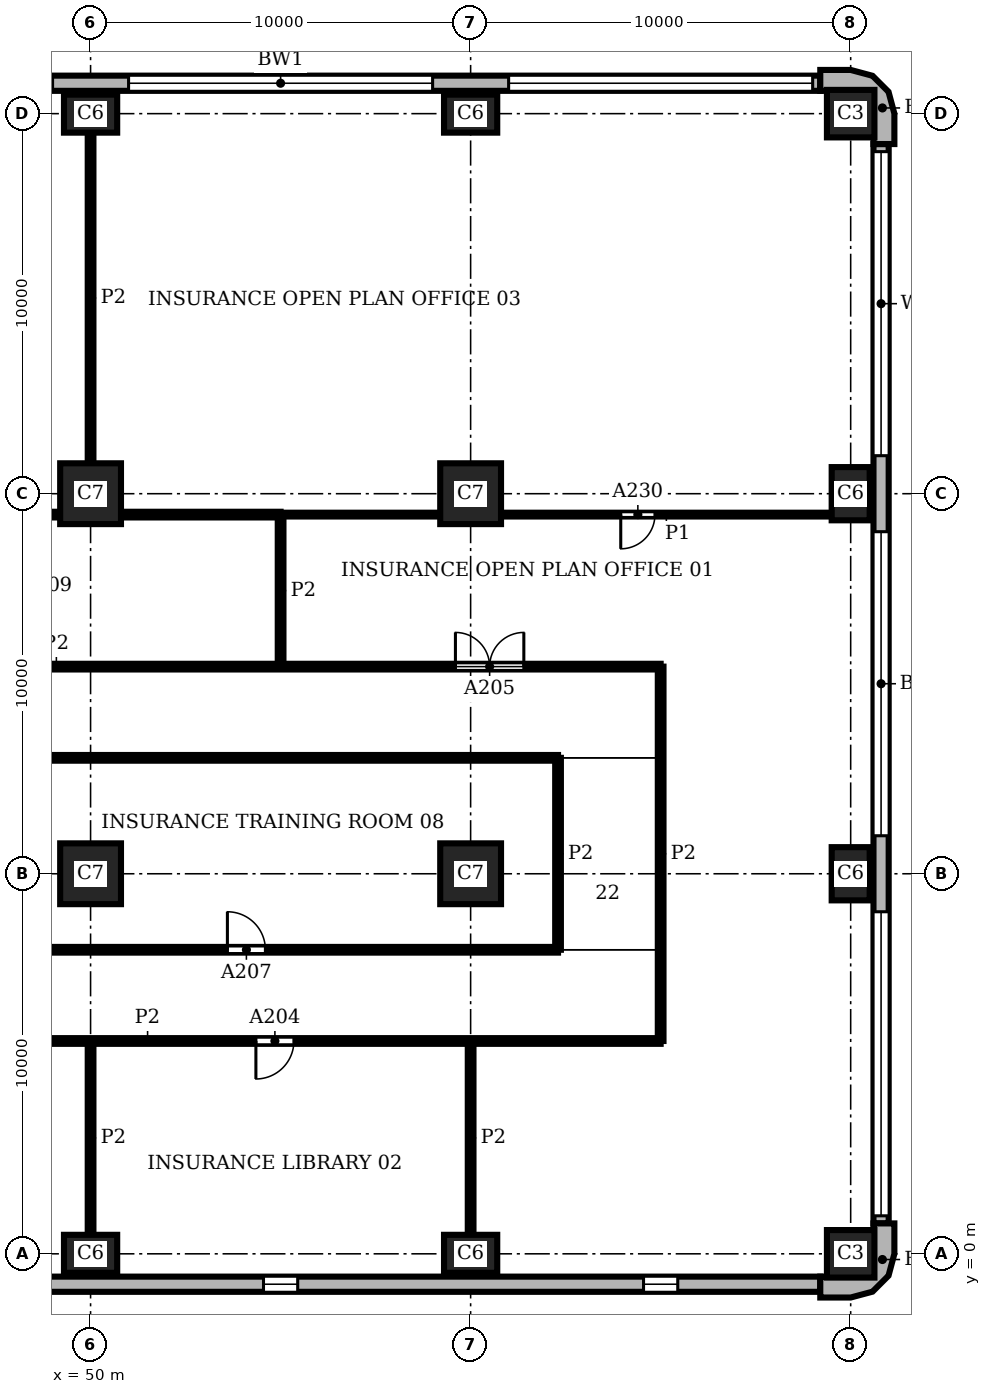
"""IFC4 building model, lengths in metres.
Left out: names, types, materials, properties, quantities, classifications, styles, units other than length and angle.
Written with IfcOpenShell. Run it as: python <this file> out.ifc"""

import sys

from ifc_helpers import new_model, si_unit, direction, frame, frame_2d, origin, origin_2d, place, context, subcontext, project, spatial, polyline, rectangle, outline, extrude, element, fill, save


model = new_model("IFC4")
c1 = context("Model", 3, precision=1e-05, world=origin(), true_north=direction((0.0, 1.0)))
c2 = subcontext(c1, "Body", "Model", "MODEL_VIEW")
j1 = project(units=[si_unit("LENGTHUNIT", "METRE"), si_unit("PLANEANGLEUNIT", "RADIAN")], contexts=[c1])
p1 = place(None, origin())
s1 = spatial("IfcSite", under=j1, at=p1, CompositionType="ELEMENT")
p2 = place(p1, origin())
s2 = spatial("IfcBuilding", under=s1, at=p2, CompositionType="ELEMENT")
p3 = place(p2, frame((0.0, 0.0, 23.7)))
s3 = spatial("IfcBuildingStorey", under=s2, at=p3, CompositionType="ELEMENT", Elevation=23.7)
for number, where, z_axis, x_axis in (
    (1, (50.0, 0.0, 0.0), (0.0, 0.0, 1.0), (1.0, 0.0, 0.0)),
    (2, (60.0, 0.0, 0.0), (0.0, 0.0, 1.0), (1.0, 0.0, 0.0)),
):
    element("IfcColumn", number, at=place(p3, frame(where, z_axis=z_axis, x_axis=x_axis)), inside=s3, PredefinedType="COLUMN", context=c2, shape_type="SweptSolid", body=[
        extrude(rectangle(XDim=1.4, YDim=1.0, at=origin_2d()), origin(), (0.0, 0.0, 1.0), 3.9),
    ])
p4 = place(p3, frame((70.0, 0.0, 0.0), z_axis=(0.0, 0.0, 1.0), x_axis=(1.0, 0.0, 0.0)))
e3 = element("IfcColumn", 3, at=p4, inside=s3, PredefinedType="COLUMN", context=c2, shape_type="SweptSolid", body=[
    extrude(rectangle(XDim=1.25, YDim=1.25, at=origin_2d()), origin(), (0.0, 0.0, 1.0), 3.9),
])
for number, where, z_axis, x_axis in (
    (4, (70.0, 10.0, 0.0), (0.0, 0.0, 1.0), (0.0, 1.0, 0.0)),
    (5, (70.0, 20.0, 0.0), (0.0, 0.0, 1.0), (0.0, 1.0, 0.0)),
):
    element("IfcColumn", number, at=place(p3, frame(where, z_axis=z_axis, x_axis=x_axis)), inside=s3, PredefinedType="COLUMN", context=c2, shape_type="SweptSolid", body=[
        extrude(rectangle(XDim=1.4, YDim=1.0, at=origin_2d()), origin(), (0.0, 0.0, 1.0), 3.9),
    ])
p5 = place(p3, frame((70.0, 30.0, 0.0), z_axis=(0.0, 0.0, 1.0), x_axis=(1.0, 0.0, 0.0)))
e6 = element("IfcColumn", 6, at=p5, inside=s3, PredefinedType="COLUMN", context=c2, shape_type="SweptSolid", body=[
    extrude(rectangle(XDim=1.25, YDim=1.25, at=origin_2d()), origin(), (0.0, 0.0, 1.0), 3.9),
])
for number, where, z_axis, x_axis in (
    (7, (60.0, 30.0, 0.0), (0.0, 0.0, 1.0), (1.0, 0.0, 0.0)),
    (8, (50.0, 30.0, 0.0), (0.0, 0.0, 1.0), (1.0, 0.0, 0.0)),
):
    element("IfcColumn", number, at=place(p3, frame(where, z_axis=z_axis, x_axis=x_axis)), inside=s3, PredefinedType="COLUMN", context=c2, shape_type="SweptSolid", body=[
        extrude(rectangle(XDim=1.4, YDim=1.0, at=origin_2d()), origin(), (0.0, 0.0, 1.0), 3.9),
    ])
for number, where, z_axis, x_axis in (
    (9, (50.0, 10.0, 0.0), (0.0, 0.0, 1.0), (1.0, 0.0, 0.0)),
    (10, (50.0, 20.0, 0.0), (0.0, 0.0, 1.0), (1.0, 0.0, 0.0)),
    (11, (60.0, 10.0, 0.0), (0.0, 0.0, 1.0), (1.0, 0.0, 0.0)),
    (12, (60.0, 20.0, 0.0), (0.0, 0.0, 1.0), (1.0, 0.0, 0.0)),
):
    element("IfcColumn", number, at=place(p3, frame(where, z_axis=z_axis, x_axis=x_axis)), inside=s3, PredefinedType="COLUMN", context=c2, shape_type="SweptSolid", body=[
        extrude(rectangle(XDim=1.6, YDim=1.6, at=origin_2d()), origin(), (0.0, 0.0, 1.0), 3.9),
    ])
p6 = place(p3, origin())
e13 = element("IfcWall", 13, at=p6, inside=s3, PredefinedType="SOLIDWALL", context=c2, shape_type="SweptSolid", body=[
    extrude(outline(polyline([(69.2, -1.0), (69.2, -1.15), (70.0, -1.15), (70.575, -0.996), (70.996, -0.575), (71.15, 0.0), (71.15, 0.8), (71.0, 0.8), (70.6, 0.8), (70.6, 0.0), (70.52, -0.3), (70.3, -0.52), (70.0, -0.6), (69.2, -0.6), (69.2, -1.0)])), origin(), (0.0, 0.0, 1.0), 3.9),
])
e14 = element("IfcWall", 14, at=p6, inside=s3, PredefinedType="SOLIDWALL", context=c2, shape_type="SweptSolid", body=[
    extrude(outline(polyline([(71.0, 29.2), (71.15, 29.2), (71.15, 30.0), (70.996, 30.575), (70.575, 30.996), (70.0, 31.15), (69.2, 31.15), (69.2, 31.0), (69.2, 30.6), (70.0, 30.6), (70.3, 30.52), (70.52, 30.3), (70.6, 30.0), (70.6, 29.2), (71.0, 29.2)])), origin(), (0.0, 0.0, 1.0), 3.9),
])
p7 = place(p3, frame((20.8, -0.8, 0.0), z_axis=(0.0, 0.0, 1.0), x_axis=(1.0, 0.0, 0.0)))
e15 = element("IfcWall", 15, at=p7, inside=s3, PredefinedType="SOLIDWALL", context=c2, shape_type="SweptSolid", body=[
    extrude(rectangle(XDim=48.4, YDim=0.4, at=frame_2d((24.2, 0.0))), origin(), (0.0, 0.0, 1.0), 3.9),
])
p8 = place(p7, frame((3.75, 0.0, 0.9)))
e16 = element("IfcOpeningElement", 16, at=p8, cuts=e15, PredefinedType="OPENING", context=c2, shape_type="SweptSolid", body=[
    extrude(rectangle(XDim=0.9, YDim=2.35, at=frame_2d((0.45, 1.175))), frame((0.0, 0.21, 0.0), z_axis=(0.0, -1.0, 0.0), x_axis=(1.0, 0.0, 0.0)), (0.0, 0.0, 1.0), 0.42),
])
p9 = place(p7, frame((13.75, 0.0, 0.9)))
e17 = element("IfcOpeningElement", 17, at=p9, cuts=e15, PredefinedType="OPENING", context=c2, shape_type="SweptSolid", body=[
    extrude(rectangle(XDim=0.9, YDim=2.35, at=frame_2d((0.45, 1.175))), frame((0.0, 0.21, 0.0), z_axis=(0.0, -1.0, 0.0), x_axis=(1.0, 0.0, 0.0)), (0.0, 0.0, 1.0), 0.42),
])
p10 = place(p7, frame((23.75, 0.0, 0.9)))
e18 = element("IfcOpeningElement", 18, at=p10, cuts=e15, PredefinedType="OPENING", context=c2, shape_type="SweptSolid", body=[
    extrude(rectangle(XDim=0.9, YDim=2.35, at=frame_2d((0.45, 1.175))), frame((0.0, 0.21, 0.0), z_axis=(0.0, -1.0, 0.0), x_axis=(1.0, 0.0, 0.0)), (0.0, 0.0, 1.0), 0.42),
])
p11 = place(p7, frame((33.75, 0.0, 0.9)))
e19 = element("IfcOpeningElement", 19, at=p11, cuts=e15, PredefinedType="OPENING", context=c2, shape_type="SweptSolid", body=[
    extrude(rectangle(XDim=0.9, YDim=2.35, at=frame_2d((0.45, 1.175))), frame((0.0, 0.21, 0.0), z_axis=(0.0, -1.0, 0.0), x_axis=(1.0, 0.0, 0.0)), (0.0, 0.0, 1.0), 0.42),
])
p12 = place(p7, frame((43.75, 0.0, 0.9)))
e20 = element("IfcOpeningElement", 20, at=p12, cuts=e15, PredefinedType="OPENING", context=c2, shape_type="SweptSolid", body=[
    extrude(rectangle(XDim=0.9, YDim=2.35, at=frame_2d((0.45, 1.175))), frame((0.0, 0.21, 0.0), z_axis=(0.0, -1.0, 0.0), x_axis=(1.0, 0.0, 0.0)), (0.0, 0.0, 1.0), 0.42),
])
p13 = place(p3, frame((70.8, 0.8, 0.0), z_axis=(0.0, 0.0, 1.0), x_axis=(0.0, 1.0, 0.0)))
e21 = element("IfcWall", 21, at=p13, inside=s3, PredefinedType="SOLIDWALL", context=c2, shape_type="SweptSolid", body=[
    extrude(rectangle(XDim=28.4, YDim=0.4, at=frame_2d((14.2, 0.0))), origin(), (0.0, 0.0, 1.0), 3.9),
])
p14 = place(p13, frame((0.2, 0.0, 0.9)))
e22 = element("IfcOpeningElement", 22, at=p14, cuts=e21, PredefinedType="OPENING", context=c2, shape_type="SweptSolid", body=[
    extrude(rectangle(XDim=8.0, YDim=2.35, at=frame_2d((4.0, 1.175))), frame((0.0, 0.21, 0.0), z_axis=(0.0, -1.0, 0.0), x_axis=(1.0, 0.0, 0.0)), (0.0, 0.0, 1.0), 0.42),
])
p15 = place(p13, frame((10.2, 0.0, 0.9)))
e23 = element("IfcOpeningElement", 23, at=p15, cuts=e21, PredefinedType="OPENING", context=c2, shape_type="SweptSolid", body=[
    extrude(rectangle(XDim=8.0, YDim=2.35, at=frame_2d((4.0, 1.175))), frame((0.0, 0.21, 0.0), z_axis=(0.0, -1.0, 0.0), x_axis=(1.0, 0.0, 0.0)), (0.0, 0.0, 1.0), 0.42),
])
p16 = place(p13, frame((20.2, 0.0, 0.9)))
e24 = element("IfcOpeningElement", 24, at=p16, cuts=e21, PredefinedType="OPENING", context=c2, shape_type="SweptSolid", body=[
    extrude(rectangle(XDim=8.0, YDim=2.35, at=frame_2d((4.0, 1.175))), frame((0.0, 0.21, 0.0), z_axis=(0.0, -1.0, 0.0), x_axis=(1.0, 0.0, 0.0)), (0.0, 0.0, 1.0), 0.42),
])
p17 = place(p3, frame((69.2, 30.8, 0.0), z_axis=(0.0, 0.0, 1.0), x_axis=(-1.0, 0.0, 0.0)))
e25 = element("IfcWall", 25, at=p17, inside=s3, PredefinedType="SOLIDWALL", context=c2, shape_type="SweptSolid", body=[
    extrude(rectangle(XDim=28.4, YDim=0.4, at=frame_2d((14.2, 0.0))), origin(), (0.0, 0.0, 1.0), 3.9),
])
p18 = place(p17, frame((0.2, 0.0, 0.9)))
e26 = element("IfcOpeningElement", 26, at=p18, cuts=e25, PredefinedType="OPENING", context=c2, shape_type="SweptSolid", body=[
    extrude(rectangle(XDim=8.0, YDim=2.35, at=frame_2d((4.0, 1.175))), frame((0.0, 0.21, 0.0), z_axis=(0.0, -1.0, 0.0), x_axis=(1.0, 0.0, 0.0)), (0.0, 0.0, 1.0), 0.42),
])
p19 = place(p17, frame((10.2, 0.0, 0.9)))
e27 = element("IfcOpeningElement", 27, at=p19, cuts=e25, PredefinedType="OPENING", context=c2, shape_type="SweptSolid", body=[
    extrude(rectangle(XDim=8.0, YDim=2.35, at=frame_2d((4.0, 1.175))), frame((0.0, 0.21, 0.0), z_axis=(0.0, -1.0, 0.0), x_axis=(1.0, 0.0, 0.0)), (0.0, 0.0, 1.0), 0.42),
])
p20 = place(p17, frame((20.2, 0.0, 0.9)))
e28 = element("IfcOpeningElement", 28, at=p20, cuts=e25, PredefinedType="OPENING", context=c2, shape_type="SweptSolid", body=[
    extrude(rectangle(XDim=8.0, YDim=2.35, at=frame_2d((4.0, 1.175))), frame((0.0, 0.21, 0.0), z_axis=(0.0, -1.0, 0.0), x_axis=(1.0, 0.0, 0.0)), (0.0, 0.0, 1.0), 0.42),
])
p21 = place(p3, frame((55.0, 19.45, 0.0), z_axis=(0.0, 0.0, 1.0), x_axis=(1.0, 0.0, 0.0)))
e29 = element("IfcWall", 29, at=p21, inside=s3, PredefinedType="PARTITIONING", context=c2, shape_type="SweptSolid", body=[
    extrude(rectangle(XDim=4.2, YDim=0.1, at=frame_2d((2.1, 0.0))), origin(), (0.0, 0.0, 1.0), 3.58),
])
p22 = place(p3, frame((60.8, 19.45, 0.0), z_axis=(0.0, 0.0, 1.0), x_axis=(1.0, 0.0, 0.0)))
e30 = element("IfcWall", 30, at=p22, inside=s3, PredefinedType="PARTITIONING", context=c2, shape_type="SweptSolid", body=[
    extrude(rectangle(XDim=8.7, YDim=0.1, at=frame_2d((4.35, 0.0))), origin(), (0.0, 0.0, 1.0), 3.58),
])
p23 = place(p22, frame((3.15, 0.0, 0.0)))
e31 = element("IfcOpeningElement", 31, at=p23, cuts=e30, PredefinedType="OPENING", context=c2, shape_type="SweptSolid", body=[
    extrude(rectangle(XDim=0.9, YDim=2.1, at=frame_2d((0.45, 1.05))), frame((0.0, 0.06, 0.0), z_axis=(0.0, -1.0, 0.0), x_axis=(1.0, 0.0, 0.0)), (0.0, 0.0, 1.0), 0.12),
])
p24 = place(p3, frame((50.0, 0.5, 0.0), z_axis=(0.0, 0.0, 1.0), x_axis=(0.0, 1.0, 0.0)))
e32 = element("IfcWall", 32, at=p24, inside=s3, PredefinedType="PARTITIONING", context=c2, shape_type="SweptSolid", body=[
    extrude(rectangle(XDim=5.1, YDim=0.15, at=frame_2d((2.55, 0.0))), origin(), (0.0, 0.0, 1.0), 3.58),
])
p25 = place(p3, frame((50.0, 20.8, 0.0), z_axis=(0.0, 0.0, 1.0), x_axis=(0.0, 1.0, 0.0)))
e33 = element("IfcWall", 33, at=p25, inside=s3, PredefinedType="PARTITIONING", context=c2, shape_type="SweptSolid", body=[
    extrude(rectangle(XDim=8.7, YDim=0.15, at=frame_2d((4.35, 0.0))), origin(), (0.0, 0.0, 1.0), 3.58),
])
p26 = place(p3, frame((55.0, 15.45, 0.0), z_axis=(0.0, 0.0, 1.0), x_axis=(0.0, 1.0, 0.0)))
e34 = element("IfcWall", 34, at=p26, inside=s3, PredefinedType="PARTITIONING", context=c2, shape_type="SweptSolid", body=[
    extrude(rectangle(XDim=4.0, YDim=0.15, at=frame_2d((2.0, 0.0))), origin(), (0.0, 0.0, 1.0), 3.58),
])
p27 = place(p3, frame((60.0, 0.5, 0.0), z_axis=(0.0, 0.0, 1.0), x_axis=(0.0, 1.0, 0.0)))
e35 = element("IfcWall", 35, at=p27, inside=s3, PredefinedType="PARTITIONING", context=c2, shape_type="SweptSolid", body=[
    extrude(rectangle(XDim=5.1, YDim=0.15, at=frame_2d((2.55, 0.0))), origin(), (0.0, 0.0, 1.0), 3.58),
])
p28 = place(p3, frame((62.3, 8.0, 0.0), z_axis=(0.0, 0.0, 1.0), x_axis=(0.0, 1.0, 0.0)))
e36 = element("IfcWall", 36, at=p28, inside=s3, PredefinedType="PARTITIONING", context=c2, shape_type="SweptSolid", body=[
    extrude(rectangle(XDim=5.05, YDim=0.15, at=frame_2d((2.525, 0.0))), origin(), (0.0, 0.0, 1.0), 3.58),
])
p29 = place(p3, frame((65.0, 5.6, 0.0), z_axis=(0.0, 0.0, 1.0), x_axis=(0.0, 1.0, 0.0)))
e37 = element("IfcWall", 37, at=p29, inside=s3, PredefinedType="PARTITIONING", context=c2, shape_type="SweptSolid", body=[
    extrude(rectangle(XDim=9.85, YDim=0.15, at=frame_2d((4.925, 0.0))), origin(), (0.0, 0.0, 1.0), 3.58),
])
p30 = place(p3, frame((38.0, 5.6, 0.0), z_axis=(0.0, 0.0, 1.0), x_axis=(1.0, 0.0, 0.0)))
e38 = element("IfcWall", 38, at=p30, inside=s3, PredefinedType="PARTITIONING", context=c2, shape_type="SweptSolid", body=[
    extrude(rectangle(XDim=27.0, YDim=0.15, at=frame_2d((13.5, 0.0))), origin(), (0.0, 0.0, 1.0), 3.58),
])
p31 = place(p30, frame((6.6, 0.0, 0.0)))
e39 = element("IfcOpeningElement", 39, at=p31, cuts=e38, PredefinedType="OPENING", context=c2, shape_type="SweptSolid", body=[
    extrude(rectangle(XDim=1.0, YDim=2.1, at=frame_2d((0.5, 1.05))), frame((0.0, 0.085, 0.0), z_axis=(0.0, -1.0, 0.0), x_axis=(1.0, 0.0, 0.0)), (0.0, 0.0, 1.0), 0.17),
])
p32 = place(p30, frame((16.35, 0.0, 0.0)))
e40 = element("IfcOpeningElement", 40, at=p32, cuts=e38, PredefinedType="OPENING", context=c2, shape_type="SweptSolid", body=[
    extrude(rectangle(XDim=1.0, YDim=2.1, at=frame_2d((0.5, 1.05))), frame((0.0, 0.085, 0.0), z_axis=(0.0, -1.0, 0.0), x_axis=(1.0, 0.0, 0.0)), (0.0, 0.0, 1.0), 0.17),
])
p33 = place(p30, frame((0.35, 0.0, 0.0)))
e41 = element("IfcOpeningElement", 41, at=p33, cuts=e38, PredefinedType="OPENING", context=c2, shape_type="SweptSolid", body=[
    extrude(rectangle(XDim=1.0, YDim=2.1, at=frame_2d((0.5, 1.05))), frame((0.0, 0.085, 0.0), z_axis=(0.0, -1.0, 0.0), x_axis=(1.0, 0.0, 0.0)), (0.0, 0.0, 1.0), 0.17),
])
p34 = place(p3, frame((33.2, 8.0, 0.0), z_axis=(0.0, 0.0, 1.0), x_axis=(1.0, 0.0, 0.0)))
e42 = element("IfcWall", 42, at=p34, inside=s3, PredefinedType="PARTITIONING", context=c2, shape_type="SweptSolid", body=[
    extrude(rectangle(XDim=29.1, YDim=0.15, at=frame_2d((14.55, 0.0))), origin(), (0.0, 0.0, 1.0), 3.58),
])
p35 = place(p34, frame((20.4, 0.0, 0.0)))
e43 = element("IfcOpeningElement", 43, at=p35, cuts=e42, PredefinedType="OPENING", context=c2, shape_type="SweptSolid", body=[
    extrude(rectangle(XDim=1.0, YDim=2.1, at=frame_2d((0.5, 1.05))), frame((0.0, 0.085, 0.0), z_axis=(0.0, -1.0, 0.0), x_axis=(1.0, 0.0, 0.0)), (0.0, 0.0, 1.0), 0.17),
])
p36 = place(p3, frame((33.2, 13.05, 0.0), z_axis=(0.0, 0.0, 1.0), x_axis=(1.0, 0.0, 0.0)))
e44 = element("IfcWall", 44, at=p36, inside=s3, PredefinedType="PARTITIONING", context=c2, shape_type="SweptSolid", body=[
    extrude(rectangle(XDim=29.1, YDim=0.15, at=frame_2d((14.55, 0.0))), origin(), (0.0, 0.0, 1.0), 3.58),
])
p37 = place(p36, frame((7.6, 0.0, 0.0)))
e45 = element("IfcOpeningElement", 45, at=p37, cuts=e44, PredefinedType="OPENING", context=c2, shape_type="SweptSolid", body=[
    extrude(rectangle(XDim=1.0, YDim=2.1, at=frame_2d((0.5, 1.05))), frame((0.0, 0.085, 0.0), z_axis=(0.0, -1.0, 0.0), x_axis=(1.0, 0.0, 0.0)), (0.0, 0.0, 1.0), 0.17),
])
p38 = place(p3, frame((33.2, 15.45, 0.0), z_axis=(0.0, 0.0, 1.0), x_axis=(1.0, 0.0, 0.0)))
e46 = element("IfcWall", 46, at=p38, inside=s3, PredefinedType="PARTITIONING", context=c2, shape_type="SweptSolid", body=[
    extrude(rectangle(XDim=31.8, YDim=0.15, at=frame_2d((15.9, 0.0))), origin(), (0.0, 0.0, 1.0), 3.58),
])
p39 = place(p38, frame((26.4, 0.0, 0.0)))
e47 = element("IfcOpeningElement", 47, at=p39, cuts=e46, PredefinedType="OPENING", context=c2, shape_type="SweptSolid", body=[
    extrude(rectangle(XDim=1.8, YDim=2.1, at=frame_2d((0.9, 1.05))), frame((0.0, 0.085, 0.0), z_axis=(0.0, -1.0, 0.0), x_axis=(1.0, 0.0, 0.0)), (0.0, 0.0, 1.0), 0.17),
])
p40 = place(p38, frame((8.85, 0.0, 0.0)))
e48 = element("IfcOpeningElement", 48, at=p40, cuts=e46, PredefinedType="OPENING", context=c2, shape_type="SweptSolid", body=[
    extrude(rectangle(XDim=1.0, YDim=2.1, at=frame_2d((0.5, 1.05))), frame((0.0, 0.085, 0.0), z_axis=(0.0, -1.0, 0.0), x_axis=(1.0, 0.0, 0.0)), (0.0, 0.0, 1.0), 0.17),
])
p41 = place(p3, frame((40.8, 19.45, 0.0), z_axis=(0.0, 0.0, 1.0), x_axis=(1.0, 0.0, 0.0)))
e49 = element("IfcWall", 49, at=p41, inside=s3, PredefinedType="PARTITIONING", context=c2, shape_type="SweptSolid", body=[
    extrude(rectangle(XDim=8.4, YDim=0.15, at=frame_2d((4.2, 0.0))), origin(), (0.0, 0.0, 1.0), 3.58),
])
p42 = place(p3, frame((50.8, 19.45, 0.0), z_axis=(0.0, 0.0, 1.0), x_axis=(1.0, 0.0, 0.0)))
e50 = element("IfcWall", 50, at=p42, inside=s3, PredefinedType="PARTITIONING", context=c2, shape_type="SweptSolid", body=[
    extrude(rectangle(XDim=4.2, YDim=0.15, at=frame_2d((2.1, 0.0))), origin(), (0.0, 0.0, 1.0), 3.58),
])
p43 = place(p11, origin())
e51 = element("IfcWindow", 51, at=p43, inside=s3, PartitioningType="SINGLE_PANEL", PredefinedType="WINDOW", context=c2, shape_type="SweptSolid", body=[
    extrude(rectangle(XDim=0.9, YDim=2.35, at=frame_2d((0.45, 1.175))), frame((0.0, 0.16, 0.0), z_axis=(0.0, -1.0, 0.0), x_axis=(1.0, 0.0, 0.0)), (0.0, 0.0, 1.0), 0.06),
])
fill(e19, e51)
p44 = place(p12, origin())
e52 = element("IfcWindow", 52, at=p44, inside=s3, PartitioningType="SINGLE_PANEL", PredefinedType="WINDOW", context=c2, shape_type="SweptSolid", body=[
    extrude(rectangle(XDim=0.9, YDim=2.35, at=frame_2d((0.45, 1.175))), frame((0.0, 0.16, 0.0), z_axis=(0.0, -1.0, 0.0), x_axis=(1.0, 0.0, 0.0)), (0.0, 0.0, 1.0), 0.06),
])
fill(e20, e52)
p45 = place(p14, origin())
e53 = element("IfcWindow", 53, at=p45, inside=s3, PartitioningType="SINGLE_PANEL", PredefinedType="WINDOW", context=c2, shape_type="SweptSolid", body=[
    extrude(rectangle(XDim=8.0, YDim=2.35, at=frame_2d((4.0, 1.175))), frame((0.0, 0.16, 0.0), z_axis=(0.0, -1.0, 0.0), x_axis=(1.0, 0.0, 0.0)), (0.0, 0.0, 1.0), 0.06),
])
fill(e22, e53)
p46 = place(p15, origin())
e54 = element("IfcWindow", 54, at=p46, inside=s3, PartitioningType="SINGLE_PANEL", PredefinedType="WINDOW", context=c2, shape_type="SweptSolid", body=[
    extrude(rectangle(XDim=8.0, YDim=2.35, at=frame_2d((4.0, 1.175))), frame((0.0, 0.16, 0.0), z_axis=(0.0, -1.0, 0.0), x_axis=(1.0, 0.0, 0.0)), (0.0, 0.0, 1.0), 0.06),
])
fill(e23, e54)
p47 = place(p16, origin())
e55 = element("IfcWindow", 55, at=p47, inside=s3, PartitioningType="SINGLE_PANEL", PredefinedType="WINDOW", context=c2, shape_type="SweptSolid", body=[
    extrude(rectangle(XDim=8.0, YDim=2.35, at=frame_2d((4.0, 1.175))), frame((0.0, 0.16, 0.0), z_axis=(0.0, -1.0, 0.0), x_axis=(1.0, 0.0, 0.0)), (0.0, 0.0, 1.0), 0.06),
])
fill(e24, e55)
p48 = place(p18, origin())
e56 = element("IfcWindow", 56, at=p48, inside=s3, PartitioningType="SINGLE_PANEL", PredefinedType="WINDOW", context=c2, shape_type="SweptSolid", body=[
    extrude(rectangle(XDim=8.0, YDim=2.35, at=frame_2d((4.0, 1.175))), frame((0.0, 0.16, 0.0), z_axis=(0.0, -1.0, 0.0), x_axis=(1.0, 0.0, 0.0)), (0.0, 0.0, 1.0), 0.06),
])
fill(e26, e56)
p49 = place(p19, origin())
e57 = element("IfcWindow", 57, at=p49, inside=s3, PartitioningType="SINGLE_PANEL", PredefinedType="WINDOW", context=c2, shape_type="SweptSolid", body=[
    extrude(rectangle(XDim=8.0, YDim=2.35, at=frame_2d((4.0, 1.175))), frame((0.0, 0.16, 0.0), z_axis=(0.0, -1.0, 0.0), x_axis=(1.0, 0.0, 0.0)), (0.0, 0.0, 1.0), 0.06),
])
fill(e27, e57)
p50 = place(p32, frame((1.0, 0.0, 0.0), z_axis=(0.0, 0.0, 1.0), x_axis=(-1.0, 0.0, 0.0)))
e58 = element("IfcDoor", 58, at=p50, inside=s3, OperationType="SINGLE_SWING_RIGHT", PredefinedType="DOOR", context=c2, shape_type="SweptSolid", body=[
    extrude(rectangle(XDim=1.0, YDim=2.1, at=frame_2d((0.5, 1.05))), frame((0.0, 0.025, 0.0), z_axis=(0.0, -1.0, 0.0), x_axis=(1.0, 0.0, 0.0)), (0.0, 0.0, 1.0), 0.05),
])
fill(e40, e58)
p51 = place(p39, origin())
e59 = element("IfcDoor", 59, at=p51, inside=s3, OperationType="DOUBLE_DOOR_SINGLE_SWING", PredefinedType="DOOR", context=c2, shape_type="SweptSolid", body=[
    extrude(rectangle(XDim=1.8, YDim=2.1, at=frame_2d((0.9, 1.05))), frame((0.0, 0.025, 0.0), z_axis=(0.0, -1.0, 0.0), x_axis=(1.0, 0.0, 0.0)), (0.0, 0.0, 1.0), 0.05),
])
fill(e47, e59)
p52 = place(p35, origin())
e60 = element("IfcDoor", 60, at=p52, inside=s3, OperationType="SINGLE_SWING_LEFT", PredefinedType="DOOR", context=c2, shape_type="SweptSolid", body=[
    extrude(rectangle(XDim=1.0, YDim=2.1, at=frame_2d((0.5, 1.05))), frame((0.0, 0.025, 0.0), z_axis=(0.0, -1.0, 0.0), x_axis=(1.0, 0.0, 0.0)), (0.0, 0.0, 1.0), 0.05),
])
fill(e43, e60)
p53 = place(p23, frame((0.9, 0.0, 0.0), z_axis=(0.0, 0.0, 1.0), x_axis=(-1.0, 0.0, 0.0)))
e61 = element("IfcDoor", 61, at=p53, inside=s3, OperationType="SINGLE_SWING_RIGHT", PredefinedType="DOOR", context=c2, shape_type="SweptSolid", body=[
    extrude(rectangle(XDim=0.9, YDim=2.1, at=frame_2d((0.45, 1.05))), frame((0.0, 0.025, 0.0), z_axis=(0.0, -1.0, 0.0), x_axis=(1.0, 0.0, 0.0)), (0.0, 0.0, 1.0), 0.05),
])
fill(e31, e61)
save(model, sys.argv[1])
